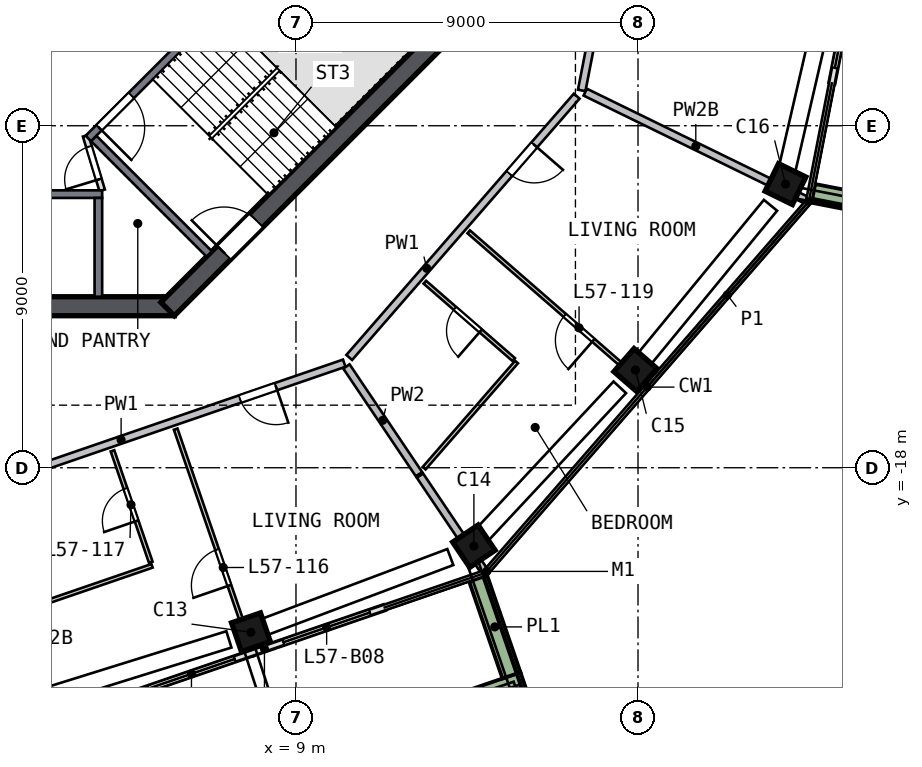
"""IFC4 building model, lengths in metres.
Left out: names, types, materials, properties, quantities, classifications, styles, units other than length and angle.
Written with IfcOpenShell. Run it as: python <this file> out.ifc"""

import sys

from ifc_helpers import new_model, si_unit, direction, frame, frame_2d, origin, origin_2d, place, context, subcontext, project, spatial, rectangle, extrude, element, fill, save


model = new_model("IFC4")
c1 = context("Model", 3, precision=1e-05, world=origin(), true_north=direction((0.0, 1.0)))
c2 = subcontext(c1, "Body", "Model", "MODEL_VIEW")
j1 = project(units=[si_unit("LENGTHUNIT", "METRE"), si_unit("PLANEANGLEUNIT", "RADIAN")], contexts=[c1])
p1 = place(None, origin())
s1 = spatial("IfcSite", under=j1, at=p1, CompositionType="ELEMENT")
p2 = place(p1, origin())
s2 = spatial("IfcBuilding", under=s1, at=p2, CompositionType="ELEMENT")
p3 = place(p2, frame((0.0, 0.0, 234.0)))
s3 = spatial("IfcBuildingStorey", under=s2, at=p3, CompositionType="ELEMENT", Elevation=234.0)
p4 = place(p3, frame((7.687, -22.375, 0.0), z_axis=(0.106162851, 0.037491609, 0.9936417), x_axis=(0.939706935, 0.322917335, -0.112584504)))
e1 = element("IfcColumn", 1, at=p4, inside=s3, PredefinedType="COLUMN", context=c2, shape_type="SweptSolid", body=[
    extrude(rectangle(XDim=0.8, YDim=0.8, at=origin_2d()), origin(), (0.0, 0.0, 1.0), 3.21),
])
p5 = place(p3, frame((13.566, -20.143, 0.0), z_axis=(0.09525605, 0.06530323, 0.993308498), x_axis=(-0.824010563, -0.55467947, 0.115487135)))
e2 = element("IfcColumn", 2, at=p5, inside=s3, PredefinedType="COLUMN", context=c2, shape_type="SweptSolid", body=[
    extrude(rectangle(XDim=0.8, YDim=0.8, at=origin_2d()), origin(), (0.0, 0.0, 1.0), 3.211),
])
p6 = place(p3, frame((17.844, -15.534, 0.0), z_axis=(0.073234353, 0.085478103, 0.993644918), x_axis=(0.652869631, 0.749060992, -0.112556101)))
e3 = element("IfcColumn", 3, at=p6, inside=s3, PredefinedType="COLUMN", context=c2, shape_type="SweptSolid", body=[
    extrude(rectangle(XDim=0.8, YDim=0.8, at=origin_2d()), origin(), (0.0, 0.0, 1.0), 3.21),
])
p7 = place(p3, frame((21.821, -10.662, 0.0), z_axis=(0.049870385, 0.104226063, 0.993302508), x_axis=(-0.436319792, -0.892342905, 0.115538643)))
e4 = element("IfcColumn", 4, at=p7, inside=s3, PredefinedType="COLUMN", context=c2, shape_type="SweptSolid", body=[
    extrude(rectangle(XDim=0.8, YDim=0.8, at=origin_2d()), origin(), (0.0, 0.0, 1.0), 3.211),
])
p8 = place(p3, frame((-5.799, -13.75, 0.0), z_axis=(0.0, 0.0, 1.0), x_axis=(1.0, 0.0, 0.0)))
e5 = element("IfcWall", 5, at=p8, inside=s3, PredefinedType="SHEAR", context=c2, shape_type="SweptSolid", body=[
    extrude(rectangle(XDim=11.598, YDim=0.5, at=frame_2d((5.799, 0.0))), origin(), (0.0, 0.0, 1.0), 3.5),
])
p9 = place(p3, frame((5.622, -13.823, 0.0), z_axis=(0.0, 0.0, 1.0), x_axis=(0.707106781, 0.707106781, 0.0)))
e6 = element("IfcWall", 6, at=p9, inside=s3, PredefinedType="SHEAR", context=c2, shape_type="SweptSolid", body=[
    extrude(rectangle(XDim=11.598, YDim=0.5, at=frame_2d((5.799, 0.0))), origin(), (0.0, 0.0, 1.0), 3.5),
])
p10 = place(p9, frame((2.099, 0.0, 0.0)))
e7 = element("IfcOpeningElement", 7, at=p10, cuts=e6, PredefinedType="OPENING", context=c2, shape_type="SweptSolid", body=[
    extrude(rectangle(XDim=1.2, YDim=2.1, at=frame_2d((0.6, 1.05))), frame((0.0, 0.26, 0.0), z_axis=(0.0, -1.0, 0.0), x_axis=(1.0, 0.0, 0.0)), (0.0, 0.0, 1.0), 0.52),
])
p11 = place(p3, frame((4.736, -23.943, 0.0), z_axis=(0.0, 0.0, 1.0), x_axis=(0.945766173, 0.32484819, 0.0)))
e8 = element("IfcWall", 8, at=p11, inside=s3, PredefinedType="SOLIDWALL", context=c2, shape_type="SweptSolid", body=[
    extrude(rectangle(XDim=3.3, YDim=0.15, at=frame_2d((1.65, 0.0))), origin(), (0.0, 0.0, 1.0), 2.525),
])
p12 = place(p11, frame((0.4, 0.0, 0.0)))
e9 = element("IfcOpeningElement", 9, at=p12, cuts=e8, PredefinedType="OPENING", context=c2, shape_type="SweptSolid", body=[
    extrude(rectangle(XDim=2.4, YDim=2.4, at=frame_2d((1.2, 1.2))), frame((0.0, 0.085, 0.0), z_axis=(0.0, -1.0, 0.0), x_axis=(1.0, 0.0, 0.0)), (0.0, 0.0, 1.0), 0.17),
])
p13 = place(p3, frame((7.857, -22.871, 0.0), z_axis=(0.0, 0.0, 1.0), x_axis=(0.945735915, 0.32493627, 0.0)))
e10 = element("IfcWall", 10, at=p13, inside=s3, PredefinedType="SOLIDWALL", context=c2, shape_type="SweptSolid", body=[
    extrude(rectangle(XDim=3.661, YDim=0.15, at=frame_2d((1.831, 0.0))), origin(), (0.0, 0.0, 1.0), 2.525),
])
p14 = place(p13, frame((0.861, 0.0, 0.0)))
e11 = element("IfcOpeningElement", 11, at=p14, cuts=e10, PredefinedType="OPENING", context=c2, shape_type="SweptSolid", body=[
    extrude(rectangle(XDim=2.4, YDim=2.4, at=frame_2d((1.2, 1.2))), frame((0.0, 0.085, 0.0), z_axis=(0.0, -1.0, 0.0), x_axis=(1.0, 0.0, 0.0)), (0.0, 0.0, 1.0), 0.17),
])
p15 = place(p3, frame((23.104, -7.87, 0.0), z_axis=(0.0, 0.0, 1.0), x_axis=(0.191532956, 0.981486183, 0.0)))
e12 = element("IfcWall", 12, at=p15, inside=s3, PredefinedType="SOLIDWALL", context=c2, shape_type="SweptSolid", body=[
    extrude(rectangle(XDim=3.3, YDim=0.15, at=frame_2d((1.65, 0.0))), origin(), (0.0, 0.0, 1.0), 2.525),
])
p16 = place(p15, frame((0.4, 0.0, 0.0)))
e13 = element("IfcOpeningElement", 13, at=p16, cuts=e12, PredefinedType="OPENING", context=c2, shape_type="SweptSolid", body=[
    extrude(rectangle(XDim=2.4, YDim=2.4, at=frame_2d((1.2, 1.2))), frame((0.0, 0.085, 0.0), z_axis=(0.0, -1.0, 0.0), x_axis=(1.0, 0.0, 0.0)), (0.0, 0.0, 1.0), 0.17),
])
p17 = place(p3, frame((4.44, -27.244, 0.0), z_axis=(0.0, 0.0, 1.0), x_axis=(0.94574505, 0.324909681, 0.0)))
e14 = element("IfcWall", 14, at=p17, inside=s3, PredefinedType="SOLIDWALL", context=c2, shape_type="SweptSolid", body=[
    extrude(rectangle(XDim=11.152, YDim=0.5, at=frame_2d((5.576, 0.0))), origin(), (0.0, 0.0, 1.0), 0.7),
])
p18 = place(p3, frame((14.67, -23.465, 0.0), z_axis=(0.0, 0.0, 1.0), x_axis=(-0.324925551, 0.945739598, 0.0)))
e15 = element("IfcWall", 15, at=p18, inside=s3, PredefinedType="SOLIDWALL", context=c2, shape_type="SweptSolid", body=[
    extrude(rectangle(XDim=2.699, YDim=0.5, at=frame_2d((1.35, 0.0))), origin(), (0.0, 0.0, 1.0), 0.7),
])
p19 = place(p3, frame((22.614, -10.78, 0.0), z_axis=(0.0, 0.0, 1.0), x_axis=(0.981497239, -0.191476291, 0.0)))
e16 = element("IfcWall", 16, at=p19, inside=s3, PredefinedType="SOLIDWALL", context=c2, shape_type="SweptSolid", body=[
    extrude(rectangle(XDim=3.199, YDim=0.5, at=frame_2d((1.6, 0.0))), origin(), (0.0, 0.0, 1.0), 0.7),
])
p20 = place(p3, frame((-3.9, -10.8, 0.0), z_axis=(0.0, 0.0, 1.0), x_axis=(1.0, 0.0, 0.0)))
e17 = element("IfcWall", 17, at=p20, inside=s3, PredefinedType="SOLIDWALL", context=c2, shape_type="SweptSolid", body=[
    extrude(rectangle(XDim=7.8, YDim=0.2, at=frame_2d((3.9, 0.0))), origin(), (0.0, 0.0, 1.0), 3.19),
])
p21 = place(p20, frame((3.45, 0.0, 0.0)))
e18 = element("IfcOpeningElement", 18, at=p21, cuts=e17, PredefinedType="OPENING", context=c2, shape_type="SweptSolid", body=[
    extrude(rectangle(XDim=0.9, YDim=2.1, at=frame_2d((0.45, 1.05))), frame((0.0, 0.11, 0.0), z_axis=(0.0, -1.0, 0.0), x_axis=(1.0, 0.0, 0.0)), (0.0, 0.0, 1.0), 0.22),
])
p22 = place(p3, frame((3.8, -10.9, 0.0), z_axis=(0.0, 0.0, 1.0), x_axis=(0.0, -1.0, 0.0)))
e19 = element("IfcWall", 19, at=p22, inside=s3, PredefinedType="SOLIDWALL", context=c2, shape_type="SweptSolid", body=[
    extrude(rectangle(XDim=2.6, YDim=0.2, at=frame_2d((1.3, 0.0))), origin(), (0.0, 0.0, 1.0), 3.19),
])
p23 = place(p3, frame((9.629, -3.24, 0.0), z_axis=(0.0, 0.0, 1.0), x_axis=(-0.707120946, -0.707092617, 0.0)))
e20 = element("IfcWall", 20, at=p23, inside=s3, PredefinedType="SOLIDWALL", context=c2, shape_type="SweptSolid", body=[
    extrude(rectangle(XDim=8.618, YDim=0.2, at=frame_2d((4.309, 0.0))), origin(), (0.0, 0.0, 1.0), 3.19),
])
p24 = place(p23, frame((7.018, 0.0, 0.0)))
e21 = element("IfcOpeningElement", 21, at=p24, cuts=e20, PredefinedType="OPENING", context=c2, shape_type="SweptSolid", body=[
    extrude(rectangle(XDim=1.2, YDim=2.1, at=frame_2d((0.6, 1.05))), frame((0.0, 0.11, 0.0), z_axis=(0.0, -1.0, 0.0), x_axis=(1.0, 0.0, 0.0)), (0.0, 0.0, 1.0), 0.22),
])
p25 = place(p3, frame((3.677, -9.334, 0.0), z_axis=(0.0, 0.0, 1.0), x_axis=(0.707078393, -0.707135168, 0.0)))
e22 = element("IfcWall", 22, at=p25, inside=s3, PredefinedType="SOLIDWALL", context=c2, shape_type="SweptSolid", body=[
    extrude(rectangle(XDim=4.3, YDim=0.2, at=frame_2d((2.15, 0.0))), origin(), (0.0, 0.0, 1.0), 3.19),
])
p26 = place(p3, frame((3.9, -10.7, 0.0), z_axis=(0.0, 0.0, 1.0), x_axis=(-0.289808785, 0.957084567, 0.0)))
e23 = element("IfcWall", 23, at=p26, inside=s3, PredefinedType="PARTITIONING", context=c2, shape_type="SweptSolid", body=[
    extrude(rectangle(XDim=1.501, YDim=0.15, at=frame_2d((0.75, 0.0))), origin(), (0.0, 0.0, 1.0), 3.19),
])
p27 = place(p26, frame((0.301, 0.0, 0.0)))
e24 = element("IfcOpeningElement", 24, at=p27, cuts=e23, PredefinedType="OPENING", context=c2, shape_type="SweptSolid", body=[
    extrude(rectangle(XDim=0.9, YDim=2.1, at=frame_2d((0.45, 1.05))), frame((0.0, 0.085, 0.0), z_axis=(0.0, -1.0, 0.0), x_axis=(1.0, 0.0, 0.0)), (0.0, 0.0, 1.0), 0.17),
])
p28 = place(p3, frame((10.27, -15.249, 0.0), z_axis=(0.0, 0.0, 1.0), x_axis=(-0.945745241, -0.324909125, 0.0)))
e25 = element("IfcWall", 25, at=p28, inside=s3, PredefinedType="SOLIDWALL", context=c2, shape_type="SweptSolid", body=[
    extrude(rectangle(XDim=9.317, YDim=0.2, at=frame_2d((4.658, 0.0))), origin(), (0.0, 0.0, 1.0), 3.19),
])
p29 = place(p28, frame((1.9, 0.0, 0.0)))
e26 = element("IfcOpeningElement", 26, at=p29, cuts=e25, PredefinedType="OPENING", context=c2, shape_type="SweptSolid", body=[
    extrude(rectangle(XDim=1.0, YDim=2.1, at=frame_2d((0.5, 1.05))), frame((0.0, 0.11, 0.0), z_axis=(0.0, -1.0, 0.0), x_axis=(1.0, 0.0, 0.0)), (0.0, 0.0, 1.0), 0.22),
])
p30 = place(p3, frame((16.387, -8.222, 0.0), z_axis=(0.0, 0.0, 1.0), x_axis=(-0.656585706, -0.754251424, 0.0)))
e27 = element("IfcWall", 27, at=p30, inside=s3, PredefinedType="SOLIDWALL", context=c2, shape_type="SweptSolid", body=[
    extrude(rectangle(XDim=9.117, YDim=0.2, at=frame_2d((4.558, 0.0))), origin(), (0.0, 0.0, 1.0), 3.19),
])
p31 = place(p30, frame((1.7, 0.0, 0.0)))
e28 = element("IfcOpeningElement", 28, at=p31, cuts=e27, PredefinedType="OPENING", context=c2, shape_type="SweptSolid", body=[
    extrude(rectangle(XDim=1.0, YDim=2.1, at=frame_2d((0.5, 1.05))), frame((0.0, 0.11, 0.0), z_axis=(0.0, -1.0, 0.0), x_axis=(1.0, 0.0, 0.0)), (0.0, 0.0, 1.0), 0.22),
])
p32 = place(p3, frame((18.302, 1.073, 0.0), z_axis=(0.0, 0.0, 1.0), x_axis=(-0.191477727, -0.981496959, 0.0)))
e29 = element("IfcWall", 29, at=p32, inside=s3, PredefinedType="SOLIDWALL", context=c2, shape_type="SweptSolid", body=[
    extrude(rectangle(XDim=9.317, YDim=0.2, at=frame_2d((4.658, 0.0))), origin(), (0.0, 0.0, 1.0), 3.19),
])
p33 = place(p32, frame((6.458, 0.0, 0.0)))
e30 = element("IfcOpeningElement", 30, at=p33, cuts=e29, PredefinedType="OPENING", context=c2, shape_type="SweptSolid", body=[
    extrude(rectangle(XDim=1.0, YDim=2.1, at=frame_2d((0.5, 1.05))), frame((0.0, 0.11, 0.0), z_axis=(0.0, -1.0, 0.0), x_axis=(1.0, 0.0, 0.0)), (0.0, 0.0, 1.0), 0.22),
])
p34 = place(p3, frame((10.328, -15.335, 0.0), z_axis=(0.0, 0.0, 1.0), x_axis=(0.558600379, -0.829436927, 0.0)))
e31 = element("IfcWall", 31, at=p34, inside=s3, PredefinedType="SOLIDWALL", context=c2, shape_type="SweptSolid", body=[
    extrude(rectangle(XDim=3.418, YDim=0.2, at=frame_2d((1.709, 0.0))), origin(), (0.0, 0.0, 1.0), 3.19),
])
p35 = place(p3, frame((12.263, -18.208, 0.0), z_axis=(0.0, 0.0, 1.0), x_axis=(0.558585582, -0.829446893, 0.0)))
e32 = element("IfcWall", 32, at=p35, inside=s3, PredefinedType="SOLIDWALL", context=c2, shape_type="SweptSolid", body=[
    extrude(rectangle(XDim=3.011, YDim=0.2, at=frame_2d((1.506, 0.0))), origin(), (0.0, 0.0, 1.0), 3.19),
])
p36 = place(p3, frame((16.612, -8.116, 0.0), z_axis=(0.0, 0.0, 1.0), x_axis=(0.898476571, -0.43902147, 0.0)))
e33 = element("IfcWall", 33, at=p36, inside=s3, PredefinedType="SOLIDWALL", context=c2, shape_type="SweptSolid", body=[
    extrude(rectangle(XDim=6.476, YDim=0.2, at=frame_2d((3.238, 0.0))), origin(), (0.0, 0.0, 1.0), 2.69),
])
p37 = place(p3, frame((1.708, -21.785, 0.0), z_axis=(0.0, 0.0, 1.0), x_axis=(0.945756863, 0.324875293, 0.0)))
e34 = element("IfcWall", 34, at=p37, inside=s3, PredefinedType="PARTITIONING", context=c2, shape_type="SweptSolid", body=[
    extrude(rectangle(XDim=3.704, YDim=0.1, at=frame_2d((1.852, 0.0))), origin(), (0.0, 0.0, 1.0), 3.19),
])
p38 = place(p3, frame((5.179, -20.487, 0.0), z_axis=(0.0, 0.0, 1.0), x_axis=(-0.324956504, 0.945728963, 0.0)))
e35 = element("IfcWall", 35, at=p38, inside=s3, PredefinedType="PARTITIONING", context=c2, shape_type="SweptSolid", body=[
    extrude(rectangle(XDim=3.1, YDim=0.1, at=frame_2d((1.55, 0.0))), origin(), (0.0, 0.0, 1.0), 3.19),
])
p39 = place(p38, frame((1.15, 0.0, 0.0)))
e36 = element("IfcOpeningElement", 36, at=p39, cuts=e35, PredefinedType="OPENING", context=c2, shape_type="SweptSolid", body=[
    extrude(rectangle(XDim=0.9, YDim=2.1, at=frame_2d((0.45, 1.05))), frame((0.0, 0.06, 0.0), z_axis=(0.0, -1.0, 0.0), x_axis=(1.0, 0.0, 0.0)), (0.0, 0.0, 1.0), 0.12),
])
p40 = place(p3, frame((7.833, -22.8, 0.0), z_axis=(0.0, 0.0, 1.0), x_axis=(-0.324920005, 0.945741503, 0.0)))
e37 = element("IfcWall", 37, at=p40, inside=s3, PredefinedType="PARTITIONING", context=c2, shape_type="SweptSolid", body=[
    extrude(rectangle(XDim=6.15, YDim=0.1, at=frame_2d((3.075, 0.0))), origin(), (0.0, 0.0, 1.0), 3.19),
])
p41 = place(p40, frame((1.8, 0.0, 0.0)))
e38 = element("IfcOpeningElement", 38, at=p41, cuts=e37, PredefinedType="OPENING", context=c2, shape_type="SweptSolid", body=[
    extrude(rectangle(XDim=1.0, YDim=2.1, at=frame_2d((0.5, 1.05))), frame((0.0, 0.06, 0.0), z_axis=(0.0, -1.0, 0.0), x_axis=(1.0, 0.0, 0.0)), (0.0, 0.0, 1.0), 0.12),
])
p42 = place(p3, frame((14.729, -15.153, 0.0), z_axis=(0.0, 0.0, 1.0), x_axis=(-0.754247659, 0.656590031, 0.0)))
e39 = element("IfcWall", 39, at=p42, inside=s3, PredefinedType="PARTITIONING", context=c2, shape_type="SweptSolid", body=[
    extrude(rectangle(XDim=3.1, YDim=0.1, at=frame_2d((1.55, 0.0))), origin(), (0.0, 0.0, 1.0), 3.19),
])
p43 = place(p42, frame((1.15, 0.0, 0.0)))
e40 = element("IfcOpeningElement", 40, at=p43, cuts=e39, PredefinedType="OPENING", context=c2, shape_type="SweptSolid", body=[
    extrude(rectangle(XDim=0.9, YDim=2.1, at=frame_2d((0.45, 1.05))), frame((0.0, 0.06, 0.0), z_axis=(0.0, -1.0, 0.0), x_axis=(1.0, 0.0, 0.0)), (0.0, 0.0, 1.0), 0.12),
])
p44 = place(p3, frame((12.372, -18.012, 0.0), z_axis=(0.0, 0.0, 1.0), x_axis=(0.656575176, 0.75426059, 0.0)))
e41 = element("IfcWall", 41, at=p44, inside=s3, PredefinedType="PARTITIONING", context=c2, shape_type="SweptSolid", body=[
    extrude(rectangle(XDim=3.704, YDim=0.1, at=frame_2d((1.852, 0.0))), origin(), (0.0, 0.0, 1.0), 3.19),
])
p45 = place(p3, frame((18.184, -15.829, 0.0), z_axis=(0.0, 0.0, 1.0), x_axis=(-0.754249014, 0.656588475, 0.0)))
e42 = element("IfcWall", 42, at=p45, inside=s3, PredefinedType="PARTITIONING", context=c2, shape_type="SweptSolid", body=[
    extrude(rectangle(XDim=6.15, YDim=0.1, at=frame_2d((3.075, 0.0))), origin(), (0.0, 0.0, 1.0), 3.19),
])
p46 = place(p45, frame((1.8, 0.0, 0.0)))
e43 = element("IfcOpeningElement", 43, at=p46, cuts=e42, PredefinedType="OPENING", context=c2, shape_type="SweptSolid", body=[
    extrude(rectangle(XDim=1.0, YDim=2.1, at=frame_2d((0.5, 1.05))), frame((0.0, 0.06, 0.0), z_axis=(0.0, -1.0, 0.0), x_axis=(1.0, 0.0, 0.0)), (0.0, 0.0, 1.0), 0.12),
])
p47 = place(p12, origin())
e44 = element("IfcDoor", 44, at=p47, inside=s3, OperationType="SLIDING_TO_RIGHT", PredefinedType="DOOR", context=c2, shape_type="SweptSolid", body=[
    extrude(rectangle(XDim=2.4, YDim=2.4, at=frame_2d((1.2, 1.2))), frame((0.0, 0.025, 0.0), z_axis=(0.0, -1.0, 0.0), x_axis=(1.0, 0.0, 0.0)), (0.0, 0.0, 1.0), 0.05),
])
fill(e9, e44)
p48 = place(p14, origin())
e45 = element("IfcDoor", 45, at=p48, inside=s3, OperationType="SLIDING_TO_LEFT", PredefinedType="DOOR", context=c2, shape_type="SweptSolid", body=[
    extrude(rectangle(XDim=2.4, YDim=2.4, at=frame_2d((1.2, 1.2))), frame((0.0, 0.025, 0.0), z_axis=(0.0, -1.0, 0.0), x_axis=(1.0, 0.0, 0.0)), (0.0, 0.0, 1.0), 0.05),
])
fill(e11, e45)
p49 = place(p16, origin())
e46 = element("IfcDoor", 46, at=p49, inside=s3, OperationType="SLIDING_TO_RIGHT", PredefinedType="DOOR", context=c2, shape_type="SweptSolid", body=[
    extrude(rectangle(XDim=2.4, YDim=2.4, at=frame_2d((1.2, 1.2))), frame((0.0, 0.025, 0.0), z_axis=(0.0, -1.0, 0.0), x_axis=(1.0, 0.0, 0.0)), (0.0, 0.0, 1.0), 0.05),
])
fill(e13, e46)
p50 = place(p24, origin())
e47 = element("IfcDoor", 47, at=p50, inside=s3, OperationType="SINGLE_SWING_RIGHT", PredefinedType="DOOR", context=c2, shape_type="SweptSolid", body=[
    extrude(rectangle(XDim=1.2, YDim=2.1, at=frame_2d((0.6, 1.05))), frame((0.0, 0.025, 0.0), z_axis=(0.0, -1.0, 0.0), x_axis=(1.0, 0.0, 0.0)), (0.0, 0.0, 1.0), 0.05),
])
fill(e21, e47)
p51 = place(p10, origin())
e48 = element("IfcDoor", 48, at=p51, inside=s3, OperationType="SINGLE_SWING_LEFT", PredefinedType="DOOR", context=c2, shape_type="SweptSolid", body=[
    extrude(rectangle(XDim=1.2, YDim=2.1, at=frame_2d((0.6, 1.05))), frame((0.0, 0.025, 0.0), z_axis=(0.0, -1.0, 0.0), x_axis=(1.0, 0.0, 0.0)), (0.0, 0.0, 1.0), 0.05),
])
fill(e7, e48)
p52 = place(p27, origin())
e49 = element("IfcDoor", 49, at=p52, inside=s3, OperationType="SINGLE_SWING_LEFT", PredefinedType="DOOR", context=c2, shape_type="SweptSolid", body=[
    extrude(rectangle(XDim=0.9, YDim=2.1, at=frame_2d((0.45, 1.05))), frame((0.0, 0.025, 0.0), z_axis=(0.0, -1.0, 0.0), x_axis=(1.0, 0.0, 0.0)), (0.0, 0.0, 1.0), 0.05),
])
fill(e24, e49)
p53 = place(p29, origin())
e50 = element("IfcDoor", 50, at=p53, inside=s3, OperationType="SINGLE_SWING_LEFT", PredefinedType="DOOR", context=c2, shape_type="SweptSolid", body=[
    extrude(rectangle(XDim=1.0, YDim=2.1, at=frame_2d((0.5, 1.05))), frame((0.0, 0.025, 0.0), z_axis=(0.0, -1.0, 0.0), x_axis=(1.0, 0.0, 0.0)), (0.0, 0.0, 1.0), 0.05),
])
fill(e26, e50)
p54 = place(p41, origin())
e51 = element("IfcDoor", 51, at=p54, inside=s3, OperationType="SINGLE_SWING_LEFT", PredefinedType="DOOR", context=c2, shape_type="SweptSolid", body=[
    extrude(rectangle(XDim=1.0, YDim=2.1, at=frame_2d((0.5, 1.05))), frame((0.0, 0.025, 0.0), z_axis=(0.0, -1.0, 0.0), x_axis=(1.0, 0.0, 0.0)), (0.0, 0.0, 1.0), 0.05),
])
fill(e38, e51)
p55 = place(p39, origin())
e52 = element("IfcDoor", 52, at=p55, inside=s3, OperationType="SINGLE_SWING_LEFT", PredefinedType="DOOR", context=c2, shape_type="SweptSolid", body=[
    extrude(rectangle(XDim=0.9, YDim=2.1, at=frame_2d((0.45, 1.05))), frame((0.0, 0.025, 0.0), z_axis=(0.0, -1.0, 0.0), x_axis=(1.0, 0.0, 0.0)), (0.0, 0.0, 1.0), 0.05),
])
fill(e36, e52)
p56 = place(p31, origin())
e53 = element("IfcDoor", 53, at=p56, inside=s3, OperationType="SINGLE_SWING_LEFT", PredefinedType="DOOR", context=c2, shape_type="SweptSolid", body=[
    extrude(rectangle(XDim=1.0, YDim=2.1, at=frame_2d((0.5, 1.05))), frame((0.0, 0.025, 0.0), z_axis=(0.0, -1.0, 0.0), x_axis=(1.0, 0.0, 0.0)), (0.0, 0.0, 1.0), 0.05),
])
fill(e28, e53)
p57 = place(p46, origin())
e54 = element("IfcDoor", 54, at=p57, inside=s3, OperationType="SINGLE_SWING_LEFT", PredefinedType="DOOR", context=c2, shape_type="SweptSolid", body=[
    extrude(rectangle(XDim=1.0, YDim=2.1, at=frame_2d((0.5, 1.05))), frame((0.0, 0.025, 0.0), z_axis=(0.0, -1.0, 0.0), x_axis=(1.0, 0.0, 0.0)), (0.0, 0.0, 1.0), 0.05),
])
fill(e43, e54)
p58 = place(p43, origin())
e55 = element("IfcDoor", 55, at=p58, inside=s3, OperationType="SINGLE_SWING_LEFT", PredefinedType="DOOR", context=c2, shape_type="SweptSolid", body=[
    extrude(rectangle(XDim=0.9, YDim=2.1, at=frame_2d((0.45, 1.05))), frame((0.0, 0.025, 0.0), z_axis=(0.0, -1.0, 0.0), x_axis=(1.0, 0.0, 0.0)), (0.0, 0.0, 1.0), 0.05),
])
fill(e40, e55)
save(model, sys.argv[1])
